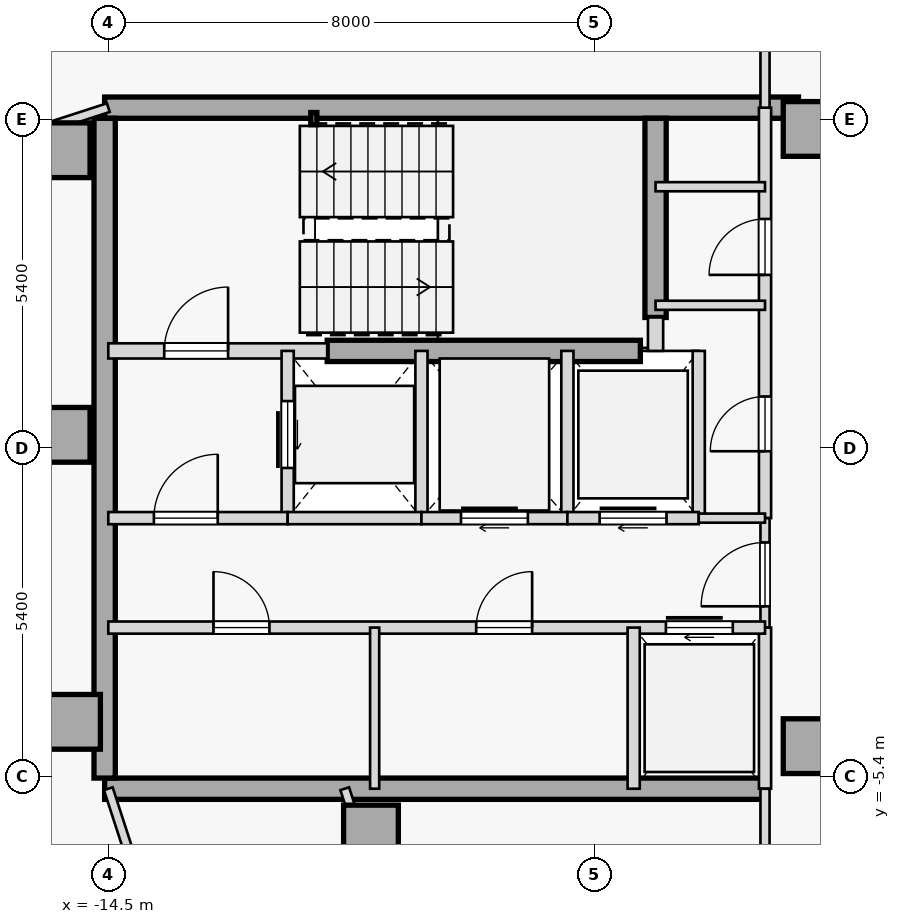
"""IFC4 building model, lengths in metres.
Left out: names, types, materials, properties, quantities, classifications, styles, units other than length and angle.
Written with IfcOpenShell. Run it as: python <this file> out.ifc"""

import sys

from ifc_helpers import new_model, si_unit, direction, frame, frame_2d, origin, origin_2d, place, context, subcontext, project, spatial, rectangle, hollow_rectangle, extrude, element, fill, save


model = new_model("IFC4")
c1 = context("Model", 3, precision=1e-05, world=origin(), true_north=direction((0.0, 1.0)))
c2 = subcontext(c1, "Body", "Model", "MODEL_VIEW")
j1 = project(units=[si_unit("LENGTHUNIT", "METRE"), si_unit("PLANEANGLEUNIT", "RADIAN")], contexts=[c1])
p1 = place(None, origin())
s1 = spatial("IfcSite", under=j1, at=p1, CompositionType="ELEMENT")
p2 = place(p1, origin())
s2 = spatial("IfcBuilding", under=s1, at=p2, CompositionType="ELEMENT")
p3 = place(p2, frame((0.0, 0.0, 220.95)))
s3 = spatial("IfcBuildingStorey", under=s2, at=p3, CompositionType="ELEMENT", Elevation=220.95)
for number, where, z_axis, x_axis in (
    (1, (-15.25, 4.9, 0.0), (0.0, 0.0, 1.0), (1.0, 0.0, 0.0)),
    (2, (-15.25, 0.22, 0.0), (0.0, 0.0, 1.0), (1.0, 0.0, 0.0)),
    (3, (-15.08, -4.5, 0.0), (0.0, 0.0, 1.0), (1.0, 0.0, 0.0)),
    (4, (-10.18, -6.32, 0.0), (0.0, 0.0, 1.0), (1.0, 0.0, 0.0)),
    (5, (-2.95, -4.9, 0.0), (0.0, 0.0, 1.0), (1.0, 0.0, 0.0)),
    (6, (-2.95, 5.25, 0.0), (0.0, 0.0, 1.0), (1.0, 0.0, 0.0)),
):
    element("IfcColumn", number, at=place(p3, frame(where, z_axis=z_axis, x_axis=x_axis)), inside=s3, PredefinedType="COLUMN", context=c2, shape_type="SweptSolid", body=[
        extrude(rectangle(XDim=0.9, YDim=0.9, at=origin_2d()), origin(), (0.0, 0.0, 1.0), 3.35),
    ])
p4 = place(p3, frame((-14.56, 5.6, 0.0), z_axis=(0.0, 0.0, 1.0), x_axis=(1.0, 0.0, 0.0)))
e7 = element("IfcWall", 7, at=p4, inside=s3, PredefinedType="SHEAR", context=c2, shape_type="SweptSolid", body=[
    extrude(rectangle(XDim=11.41, YDim=0.35, at=frame_2d((5.705, 0.0))), origin(), (0.0, 0.0, 1.0), 3.125),
])
p5 = place(p3, frame((-14.56, -5.6, 0.0), z_axis=(0.0, 0.0, 1.0), x_axis=(1.0, 0.0, 0.0)))
e8 = element("IfcWall", 8, at=p5, inside=s3, PredefinedType="SHEAR", context=c2, shape_type="SweptSolid", body=[
    extrude(rectangle(XDim=10.86, YDim=0.35, at=frame_2d((5.43, 0.0))), origin(), (0.0, 0.0, 1.0), 3.125),
])
p6 = place(p3, frame((-14.56, -5.425, 0.0), z_axis=(0.0, 0.0, 1.0), x_axis=(0.0, 1.0, 0.0)))
e9 = element("IfcWall", 9, at=p6, inside=s3, PredefinedType="SHEAR", context=c2, shape_type="SweptSolid", body=[
    extrude(rectangle(XDim=10.85, YDim=0.35, at=frame_2d((5.425, 0.0))), origin(), (0.0, 0.0, 1.0), 3.125),
])
p7 = place(p3, frame((-5.5, 2.15, 0.0), z_axis=(0.0, 0.0, 1.0), x_axis=(0.0, 1.0, 0.0)))
e10 = element("IfcWall", 10, at=p7, inside=s3, PredefinedType="SHEAR", context=c2, shape_type="SweptSolid", body=[
    extrude(rectangle(XDim=3.275, YDim=0.35, at=frame_2d((1.638, 0.0))), origin(), (0.0, 0.0, 1.0), 3.125),
])
p8 = place(p3, frame((-10.9, 1.6, 0.0), z_axis=(0.0, 0.0, 1.0), x_axis=(1.0, 0.0, 0.0)))
e11 = element("IfcWall", 11, at=p8, inside=s3, PredefinedType="SHEAR", context=c2, shape_type="SweptSolid", body=[
    extrude(rectangle(XDim=5.15, YDim=0.35, at=frame_2d((2.575, 0.0))), origin(), (0.0, 0.0, 1.0), 3.125),
])
p9 = place(p3, frame((-11.12, 5.42, 0.0), z_axis=(0.0, 0.0, 1.0), x_axis=(1.0, 0.0, 0.0)))
e12 = element("IfcColumn", 12, at=p9, inside=s3, PredefinedType="COLUMN", context=c2, shape_type="SweptSolid", body=[
    extrude(hollow_rectangle(XDim=0.1, YDim=0.2, WallThickness=0.008, at=origin_2d()), origin(), (0.0, 0.0, 1.0), 3.35),
])
p10 = place(p3, frame((-14.5, 1.6, 0.0), z_axis=(0.0, 0.0, 1.0), x_axis=(1.0, 0.0, 0.0)))
e13 = element("IfcWall", 13, at=p10, inside=s3, PredefinedType="STANDARD", context=c2, shape_type="SweptSolid", body=[
    extrude(rectangle(XDim=3.6, YDim=0.25, at=frame_2d((1.8, 0.0))), origin(), (0.0, 0.0, 1.0), 3.125),
])
p11 = place(p10, frame((0.92, 0.0, 0.0)))
e14 = element("IfcOpeningElement", 14, at=p11, cuts=e13, PredefinedType="OPENING", context=c2, shape_type="SweptSolid", body=[
    extrude(rectangle(XDim=1.05, YDim=2.15, at=frame_2d((0.525, 1.075))), frame((0.0, 0.135, 0.0), z_axis=(0.0, -1.0, 0.0), x_axis=(1.0, 0.0, 0.0)), (0.0, 0.0, 1.0), 0.27),
])
p12 = place(p3, frame((-5.5, 1.6, 0.0), z_axis=(0.0, 0.0, 1.0), x_axis=(0.0, 1.0, 0.0)))
e15 = element("IfcWall", 15, at=p12, inside=s3, PredefinedType="STANDARD", context=c2, shape_type="SweptSolid", body=[
    extrude(rectangle(XDim=0.55, YDim=0.25, at=frame_2d((0.275, 0.0))), origin(), (0.0, 0.0, 1.0), 3.125),
])
p13 = place(p3, frame((-3.7, -1.15, 0.0), z_axis=(0.0, 0.0, 1.0), x_axis=(0.0, 1.0, 0.0)))
e16 = element("IfcWall", 16, at=p13, inside=s3, PredefinedType="STANDARD", context=c2, shape_type="SweptSolid", body=[
    extrude(rectangle(XDim=6.75, YDim=0.2, at=frame_2d((3.375, 0.0))), origin(), (0.0, 0.0, 1.0), 3.125),
])
p14 = place(p13, frame((1.1, 0.0, 0.0)))
e17 = element("IfcOpeningElement", 17, at=p14, cuts=e16, PredefinedType="OPENING", context=c2, shape_type="SweptSolid", body=[
    extrude(rectangle(XDim=0.9, YDim=2.15, at=frame_2d((0.45, 1.075))), frame((0.0, 0.11, 0.0), z_axis=(0.0, -1.0, 0.0), x_axis=(1.0, 0.0, 0.0)), (0.0, 0.0, 1.0), 0.22),
])
p15 = place(p13, frame((4.0, 0.0, 0.0)))
e18 = element("IfcOpeningElement", 18, at=p15, cuts=e16, PredefinedType="OPENING", context=c2, shape_type="SweptSolid", body=[
    extrude(rectangle(XDim=0.92, YDim=2.15, at=frame_2d((0.46, 1.075))), frame((0.0, 0.11, 0.0), z_axis=(0.0, -1.0, 0.0), x_axis=(1.0, 0.0, 0.0)), (0.0, 0.0, 1.0), 0.22),
])
p16 = place(p3, frame((-3.7, -2.95, 0.0), z_axis=(0.0, 0.0, 1.0), x_axis=(0.0, 1.0, 0.0)))
e19 = element("IfcWall", 19, at=p16, inside=s3, PredefinedType="PARTITIONING", context=c2, shape_type="SweptSolid", body=[
    extrude(rectangle(XDim=1.8, YDim=0.15, at=frame_2d((0.9, 0.0))), origin(), (0.0, 0.0, 1.0), 3.125),
])
p17 = place(p16, frame((0.35, 0.0, 0.0)))
e20 = element("IfcOpeningElement", 20, at=p17, cuts=e19, PredefinedType="OPENING", context=c2, shape_type="SweptSolid", body=[
    extrude(rectangle(XDim=1.05, YDim=2.18, at=frame_2d((0.525, 1.09))), frame((0.0, 0.085, 0.0), z_axis=(0.0, -1.0, 0.0), x_axis=(1.0, 0.0, 0.0)), (0.0, 0.0, 1.0), 0.17),
])
p18 = place(p3, frame((-3.7, -5.6, 0.0), z_axis=(0.0, 0.0, 1.0), x_axis=(0.0, 1.0, 0.0)))
e21 = element("IfcWall", 21, at=p18, inside=s3, PredefinedType="STANDARD", context=c2, shape_type="SweptSolid", body=[
    extrude(rectangle(XDim=2.65, YDim=0.2, at=frame_2d((1.325, 0.0))), origin(), (0.0, 0.0, 1.0), 3.125),
])
p19 = place(p3, frame((-11.55, -1.15, 0.0), z_axis=(0.0, 0.0, 1.0), x_axis=(0.0, 1.0, 0.0)))
e22 = element("IfcWall", 22, at=p19, inside=s3, PredefinedType="STANDARD", context=c2, shape_type="SweptSolid", body=[
    extrude(rectangle(XDim=2.75, YDim=0.2, at=frame_2d((1.375, 0.0))), origin(), (0.0, 0.0, 1.0), 3.125),
])
p20 = place(p19, frame((0.825, 0.0, 0.0)))
e23 = element("IfcOpeningElement", 23, at=p20, cuts=e22, PredefinedType="OPENING", context=c2, shape_type="SweptSolid", body=[
    extrude(rectangle(XDim=1.1, YDim=2.15, at=frame_2d((0.55, 1.075))), frame((0.0, 0.11, 0.0), z_axis=(0.0, -1.0, 0.0), x_axis=(1.0, 0.0, 0.0)), (0.0, 0.0, 1.0), 0.22),
])
p21 = place(p3, frame((-9.35, -1.15, 0.0), z_axis=(0.0, 0.0, 1.0), x_axis=(0.0, 1.0, 0.0)))
e24 = element("IfcWall", 24, at=p21, inside=s3, PredefinedType="STANDARD", context=c2, shape_type="SweptSolid", body=[
    extrude(rectangle(XDim=2.75, YDim=0.2, at=frame_2d((1.375, 0.0))), origin(), (0.0, 0.0, 1.0), 3.125),
])
p22 = place(p3, frame((-14.5, -1.15, 0.0), z_axis=(0.0, 0.0, 1.0), x_axis=(1.0, 0.0, 0.0)))
e25 = element("IfcWall", 25, at=p22, inside=s3, PredefinedType="STANDARD", context=c2, shape_type="SweptSolid", body=[
    extrude(rectangle(XDim=2.95, YDim=0.2, at=frame_2d((1.475, 0.0))), origin(), (0.0, 0.0, 1.0), 3.125),
])
p23 = place(p22, frame((0.75, 0.0, 0.0)))
e26 = element("IfcOpeningElement", 26, at=p23, cuts=e25, PredefinedType="OPENING", context=c2, shape_type="SweptSolid", body=[
    extrude(rectangle(XDim=1.05, YDim=2.18, at=frame_2d((0.525, 1.09))), frame((0.0, 0.11, 0.0), z_axis=(0.0, -1.0, 0.0), x_axis=(1.0, 0.0, 0.0)), (0.0, 0.0, 1.0), 0.22),
])
p24 = place(p3, frame((-11.55, -1.15, 0.0), z_axis=(0.0, 0.0, 1.0), x_axis=(1.0, 0.0, 0.0)))
e27 = element("IfcWall", 27, at=p24, inside=s3, PredefinedType="STANDARD", context=c2, shape_type="SweptSolid", body=[
    extrude(rectangle(XDim=2.2, YDim=0.2, at=frame_2d((1.1, 0.0))), origin(), (0.0, 0.0, 1.0), 3.125),
])
p25 = place(p3, frame((-6.95, -1.15, 0.0), z_axis=(0.0, 0.0, 1.0), x_axis=(0.0, 1.0, 0.0)))
e28 = element("IfcWall", 28, at=p25, inside=s3, PredefinedType="STANDARD", context=c2, shape_type="SweptSolid", body=[
    extrude(rectangle(XDim=2.75, YDim=0.2, at=frame_2d((1.375, 0.0))), origin(), (0.0, 0.0, 1.0), 3.125),
])
p26 = place(p3, frame((-9.35, -1.15, 0.0), z_axis=(0.0, 0.0, 1.0), x_axis=(1.0, 0.0, 0.0)))
e29 = element("IfcWall", 29, at=p26, inside=s3, PredefinedType="STANDARD", context=c2, shape_type="SweptSolid", body=[
    extrude(rectangle(XDim=2.4, YDim=0.2, at=frame_2d((1.2, 0.0))), origin(), (0.0, 0.0, 1.0), 3.125),
])
p27 = place(p26, frame((0.65, 0.0, 0.0)))
e30 = element("IfcOpeningElement", 30, at=p27, cuts=e29, PredefinedType="OPENING", context=c2, shape_type="SweptSolid", body=[
    extrude(rectangle(XDim=1.1, YDim=2.15, at=frame_2d((0.55, 1.075))), frame((0.0, 0.11, 0.0), z_axis=(0.0, -1.0, 0.0), x_axis=(1.0, 0.0, 0.0)), (0.0, 0.0, 1.0), 0.22),
])
p28 = place(p3, frame((-4.79, -1.15, 0.0), z_axis=(0.0, 0.0, 1.0), x_axis=(0.0, 1.0, 0.0)))
e31 = element("IfcWall", 31, at=p28, inside=s3, PredefinedType="STANDARD", context=c2, shape_type="SweptSolid", body=[
    extrude(rectangle(XDim=2.75, YDim=0.2, at=frame_2d((1.375, 0.0))), origin(), (0.0, 0.0, 1.0), 3.125),
])
p29 = place(p3, frame((-6.95, -1.15, 0.0), z_axis=(0.0, 0.0, 1.0), x_axis=(1.0, 0.0, 0.0)))
e32 = element("IfcWall", 32, at=p29, inside=s3, PredefinedType="STANDARD", context=c2, shape_type="SweptSolid", body=[
    extrude(rectangle(XDim=2.16, YDim=0.2, at=frame_2d((1.08, 0.0))), origin(), (0.0, 0.0, 1.0), 3.125),
])
p30 = place(p29, frame((0.53, 0.0, 0.0)))
e33 = element("IfcOpeningElement", 33, at=p30, cuts=e32, PredefinedType="OPENING", context=c2, shape_type="SweptSolid", body=[
    extrude(rectangle(XDim=1.1, YDim=2.15, at=frame_2d((0.55, 1.075))), frame((0.0, 0.11, 0.0), z_axis=(0.0, -1.0, 0.0), x_axis=(1.0, 0.0, 0.0)), (0.0, 0.0, 1.0), 0.22),
])
p31 = place(p3, frame((-4.79, -1.15, 0.0), z_axis=(0.0, 0.0, 1.0), x_axis=(1.0, 0.0, 0.0)))
e34 = element("IfcWall", 34, at=p31, inside=s3, PredefinedType="PARTITIONING", context=c2, shape_type="SweptSolid", body=[
    extrude(rectangle(XDim=1.09, YDim=0.15, at=frame_2d((0.545, 0.0))), origin(), (0.0, 0.0, 1.0), 3.125),
])
p32 = place(p3, frame((-14.5, -2.95, 0.0), z_axis=(0.0, 0.0, 1.0), x_axis=(1.0, 0.0, 0.0)))
e35 = element("IfcWall", 35, at=p32, inside=s3, PredefinedType="STANDARD", context=c2, shape_type="SweptSolid", body=[
    extrude(rectangle(XDim=10.8, YDim=0.2, at=frame_2d((5.4, 0.0))), origin(), (0.0, 0.0, 1.0), 3.125),
])
p33 = place(p32, frame((9.17, 0.0, 0.0)))
e36 = element("IfcOpeningElement", 36, at=p33, cuts=e35, PredefinedType="OPENING", context=c2, shape_type="SweptSolid", body=[
    extrude(rectangle(XDim=1.1, YDim=2.15, at=frame_2d((0.55, 1.075))), frame((0.0, 0.11, 0.0), z_axis=(0.0, -1.0, 0.0), x_axis=(1.0, 0.0, 0.0)), (0.0, 0.0, 1.0), 0.22),
])
p34 = place(p32, frame((1.73, 0.0, 0.0)))
e37 = element("IfcOpeningElement", 37, at=p34, cuts=e35, PredefinedType="OPENING", context=c2, shape_type="SweptSolid", body=[
    extrude(rectangle(XDim=0.92, YDim=2.15, at=frame_2d((0.46, 1.075))), frame((0.0, 0.11, 0.0), z_axis=(0.0, -1.0, 0.0), x_axis=(1.0, 0.0, 0.0)), (0.0, 0.0, 1.0), 0.22),
])
p35 = place(p32, frame((6.05, 0.0, 0.0)))
e38 = element("IfcOpeningElement", 38, at=p35, cuts=e35, PredefinedType="OPENING", context=c2, shape_type="SweptSolid", body=[
    extrude(rectangle(XDim=0.92, YDim=2.15, at=frame_2d((0.46, 1.075))), frame((0.0, 0.11, 0.0), z_axis=(0.0, -1.0, 0.0), x_axis=(1.0, 0.0, 0.0)), (0.0, 0.0, 1.0), 0.22),
])
p36 = place(p3, frame((-5.86, -5.6, 0.0), z_axis=(0.0, 0.0, 1.0), x_axis=(0.0, 1.0, 0.0)))
e39 = element("IfcWall", 39, at=p36, inside=s3, PredefinedType="STANDARD", context=c2, shape_type="SweptSolid", body=[
    extrude(rectangle(XDim=2.65, YDim=0.2, at=frame_2d((1.325, 0.0))), origin(), (0.0, 0.0, 1.0), 3.125),
])
p37 = place(p3, frame((-10.12, -5.6, 0.0), z_axis=(0.0, 0.0, 1.0), x_axis=(0.0, 1.0, 0.0)))
e40 = element("IfcWall", 40, at=p37, inside=s3, PredefinedType="PARTITIONING", context=c2, shape_type="SweptSolid", body=[
    extrude(rectangle(XDim=2.65, YDim=0.15, at=frame_2d((1.325, 0.0))), origin(), (0.0, 0.0, 1.0), 3.125),
])
for number, where, z_axis, x_axis in (
    (41, (-5.5, 4.3, 0.0), (0.0, 0.0, 1.0), (1.0, 0.0, 0.0)),
    (42, (-5.5, 2.35, 0.0), (0.0, 0.0, 1.0), (1.0, 0.0, 0.0)),
):
    element("IfcWall", number, at=place(p3, frame(where, z_axis=z_axis, x_axis=x_axis)), inside=s3, PredefinedType="PARTITIONING", context=c2, shape_type="SweptSolid", body=[
        extrude(rectangle(XDim=1.8, YDim=0.15, at=frame_2d((0.9, 0.0))), origin(), (0.0, 0.0, 1.0), 3.125),
    ])
p38 = place(p3, frame((-24.022, 4.21, 0.0), z_axis=(0.0, 0.0, 1.0), x_axis=(0.951058997127, 0.309009359055, 0.0)))
e43 = element("IfcWall", 43, at=p38, inside=s3, PredefinedType="PARTITIONING", context=c2, shape_type="SweptSolid", body=[
    extrude(rectangle(XDim=13.817, YDim=0.15, at=frame_2d((6.908, 0.0))), origin(), (0.0, 0.0, 1.0), 3.125),
])
p39 = place(p38, frame((6.434, 0.0, 0.0)))
e44 = element("IfcOpeningElement", 44, at=p39, cuts=e43, PredefinedType="OPENING", context=c2, shape_type="SweptSolid", body=[
    extrude(rectangle(XDim=0.95, YDim=2.15, at=frame_2d((0.475, 1.075))), frame((0.0, 0.085, 0.0), z_axis=(0.0, -1.0, 0.0), x_axis=(1.0, 0.0, 0.0)), (0.0, 0.0, 1.0), 0.17),
])
p40 = place(p3, frame((-3.7, -11.514, 0.0), z_axis=(0.0, 0.0, 1.0), x_axis=(-8.2572974e-05, 0.999999996591, 0.0)))
e45 = element("IfcWall", 45, at=p40, inside=s3, PredefinedType="PARTITIONING", context=c2, shape_type="SweptSolid", body=[
    extrude(rectangle(XDim=5.913, YDim=0.15, at=frame_2d((2.957, 0.0))), origin(), (0.0, 0.0, 1.0), 3.125),
])
p41 = place(p40, frame((2.497, 0.0, 0.0)))
e46 = element("IfcOpeningElement", 46, at=p41, cuts=e45, PredefinedType="OPENING", context=c2, shape_type="SweptSolid", body=[
    extrude(rectangle(XDim=0.92, YDim=2.15, at=frame_2d((0.46, 1.075))), frame((0.0, 0.085, 0.0), z_axis=(0.0, -1.0, 0.0), x_axis=(1.0, 0.0, 0.0)), (0.0, 0.0, 1.0), 0.17),
])
p42 = place(p3, frame((-17.792, 4.531, 0.0), z_axis=(0.0, 0.0, 1.0), x_axis=(0.951047546178, 0.309044600193, 0.0)))
e47 = element("IfcWall", 47, at=p42, inside=s3, PredefinedType="PARTITIONING", context=c2, shape_type="SweptSolid", body=[
    extrude(rectangle(XDim=3.461, YDim=0.15, at=frame_2d((1.73, 0.0))), origin(), (0.0, 0.0, 1.0), 3.125),
])
p43 = place(p42, frame((0.302, 0.0, 0.0)))
e48 = element("IfcOpeningElement", 48, at=p43, cuts=e47, PredefinedType="OPENING", context=c2, shape_type="SweptSolid", body=[
    extrude(rectangle(XDim=0.92, YDim=2.15, at=frame_2d((0.46, 1.075))), frame((0.0, 0.085, 0.0), z_axis=(0.0, -1.0, 0.0), x_axis=(1.0, 0.0, 0.0)), (0.0, 0.0, 1.0), 0.17),
])
p44 = place(p3, frame((-3.7, 5.6, 0.0), z_axis=(0.0, 0.0, 1.0), x_axis=(0.000139120755, 0.999999990323, 0.0)))
e49 = element("IfcWall", 49, at=p44, inside=s3, PredefinedType="PARTITIONING", context=c2, shape_type="SweptSolid", body=[
    extrude(rectangle(XDim=3.51, YDim=0.15, at=frame_2d((1.755, 0.0))), origin(), (0.0, 0.0, 1.0), 3.125),
])
p45 = place(p3, frame((-30.663, -9.757, 0.0), z_axis=(0.0, 0.0, 1.0), x_axis=(0.951058192995, 0.309011833974, 0.0)))
e50 = element("IfcWall", 50, at=p45, inside=s3, PredefinedType="PARTITIONING", context=c2, shape_type="SweptSolid", body=[
    extrude(rectangle(XDim=16.657, YDim=0.15, at=frame_2d((8.329, 0.0))), origin(), (0.0, 0.0, 1.0), 3.125),
])
p46 = place(p3, frame((-13.488, -8.713, 0.0), z_axis=(0.0, 0.0, 1.0), x_axis=(-0.309082700143, 0.951035164687, 0.0)))
e51 = element("IfcWall", 51, at=p46, inside=s3, PredefinedType="PARTITIONING", context=c2, shape_type="SweptSolid", body=[
    extrude(rectangle(XDim=3.274, YDim=0.15, at=frame_2d((1.637, 0.0))), origin(), (0.0, 0.0, 1.0), 3.125),
])
p47 = place(p3, frame((-8.213, -12.98, 0.0), z_axis=(0.0, 0.0, 1.0), x_axis=(-0.309017065592, 0.951056493155, 0.0)))
e52 = element("IfcWall", 52, at=p47, inside=s3, PredefinedType="PARTITIONING", context=c2, shape_type="SweptSolid", body=[
    extrude(rectangle(XDim=7.76, YDim=0.15, at=frame_2d((3.88, 0.0))), origin(), (0.0, 0.0, 1.0), 3.125),
])
p48 = place(p11, origin())
e53 = element("IfcDoor", 53, at=p48, inside=s3, OperationType="SINGLE_SWING_RIGHT", PredefinedType="DOOR", context=c2, shape_type="SweptSolid", body=[
    extrude(rectangle(XDim=1.05, YDim=2.15, at=frame_2d((0.525, 1.075))), frame((0.0, 0.025, 0.0), z_axis=(0.0, -1.0, 0.0), x_axis=(1.0, 0.0, 0.0)), (0.0, 0.0, 1.0), 0.05),
])
fill(e14, e53)
p49 = place(p23, origin())
e54 = element("IfcDoor", 54, at=p49, inside=s3, OperationType="SINGLE_SWING_RIGHT", PredefinedType="DOOR", context=c2, shape_type="SweptSolid", body=[
    extrude(rectangle(XDim=1.05, YDim=2.18, at=frame_2d((0.525, 1.09))), frame((0.0, 0.025, 0.0), z_axis=(0.0, -1.0, 0.0), x_axis=(1.0, 0.0, 0.0)), (0.0, 0.0, 1.0), 0.05),
])
fill(e26, e54)
p50 = place(p17, origin())
e55 = element("IfcDoor", 55, at=p50, inside=s3, OperationType="SINGLE_SWING_LEFT", PredefinedType="DOOR", context=c2, shape_type="SweptSolid", body=[
    extrude(rectangle(XDim=1.05, YDim=2.18, at=frame_2d((0.525, 1.09))), frame((0.0, 0.025, 0.0), z_axis=(0.0, -1.0, 0.0), x_axis=(1.0, 0.0, 0.0)), (0.0, 0.0, 1.0), 0.05),
])
fill(e20, e55)
p51 = place(p20, origin())
e56 = element("IfcDoor", 56, at=p51, inside=s3, OperationType="SLIDING_TO_RIGHT", PredefinedType="DOOR", context=c2, shape_type="SweptSolid", body=[
    extrude(rectangle(XDim=1.1, YDim=2.15, at=frame_2d((0.55, 1.075))), frame((0.0, 0.025, 0.0), z_axis=(0.0, -1.0, 0.0), x_axis=(1.0, 0.0, 0.0)), (0.0, 0.0, 1.0), 0.05),
])
fill(e23, e56)
p52 = place(p27, origin())
e57 = element("IfcDoor", 57, at=p52, inside=s3, OperationType="SLIDING_TO_RIGHT", PredefinedType="DOOR", context=c2, shape_type="SweptSolid", body=[
    extrude(rectangle(XDim=1.1, YDim=2.15, at=frame_2d((0.55, 1.075))), frame((0.0, 0.025, 0.0), z_axis=(0.0, -1.0, 0.0), x_axis=(1.0, 0.0, 0.0)), (0.0, 0.0, 1.0), 0.05),
])
fill(e30, e57)
p53 = place(p30, origin())
e58 = element("IfcDoor", 58, at=p53, inside=s3, OperationType="SLIDING_TO_RIGHT", PredefinedType="DOOR", context=c2, shape_type="SweptSolid", body=[
    extrude(rectangle(XDim=1.1, YDim=2.15, at=frame_2d((0.55, 1.075))), frame((0.0, 0.025, 0.0), z_axis=(0.0, -1.0, 0.0), x_axis=(1.0, 0.0, 0.0)), (0.0, 0.0, 1.0), 0.05),
])
fill(e33, e58)
p54 = place(p33, origin())
e59 = element("IfcDoor", 59, at=p54, inside=s3, OperationType="SLIDING_TO_RIGHT", PredefinedType="DOOR", context=c2, shape_type="SweptSolid", body=[
    extrude(rectangle(XDim=1.1, YDim=2.15, at=frame_2d((0.55, 1.075))), frame((0.0, 0.025, 0.0), z_axis=(0.0, -1.0, 0.0), x_axis=(1.0, 0.0, 0.0)), (0.0, 0.0, 1.0), 0.05),
])
fill(e36, e59)
p55 = place(p34, origin())
e60 = element("IfcDoor", 60, at=p55, inside=s3, OperationType="SINGLE_SWING_LEFT", PredefinedType="DOOR", context=c2, shape_type="SweptSolid", body=[
    extrude(rectangle(XDim=0.92, YDim=2.15, at=frame_2d((0.46, 1.075))), frame((0.0, 0.025, 0.0), z_axis=(0.0, -1.0, 0.0), x_axis=(1.0, 0.0, 0.0)), (0.0, 0.0, 1.0), 0.05),
])
fill(e37, e60)
p56 = place(p35, origin())
e61 = element("IfcDoor", 61, at=p56, inside=s3, OperationType="SINGLE_SWING_RIGHT", PredefinedType="DOOR", context=c2, shape_type="SweptSolid", body=[
    extrude(rectangle(XDim=0.92, YDim=2.15, at=frame_2d((0.46, 1.075))), frame((0.0, 0.025, 0.0), z_axis=(0.0, -1.0, 0.0), x_axis=(1.0, 0.0, 0.0)), (0.0, 0.0, 1.0), 0.05),
])
fill(e38, e61)
p57 = place(p14, origin())
e62 = element("IfcDoor", 62, at=p57, inside=s3, OperationType="SINGLE_SWING_LEFT", PredefinedType="DOOR", context=c2, shape_type="SweptSolid", body=[
    extrude(rectangle(XDim=0.9, YDim=2.15, at=frame_2d((0.45, 1.075))), frame((0.0, 0.025, 0.0), z_axis=(0.0, -1.0, 0.0), x_axis=(1.0, 0.0, 0.0)), (0.0, 0.0, 1.0), 0.05),
])
fill(e17, e62)
p58 = place(p15, origin())
e63 = element("IfcDoor", 63, at=p58, inside=s3, OperationType="SINGLE_SWING_LEFT", PredefinedType="DOOR", context=c2, shape_type="SweptSolid", body=[
    extrude(rectangle(XDim=0.92, YDim=2.15, at=frame_2d((0.46, 1.075))), frame((0.0, 0.025, 0.0), z_axis=(0.0, -1.0, 0.0), x_axis=(1.0, 0.0, 0.0)), (0.0, 0.0, 1.0), 0.05),
])
fill(e18, e63)
save(model, sys.argv[1])
